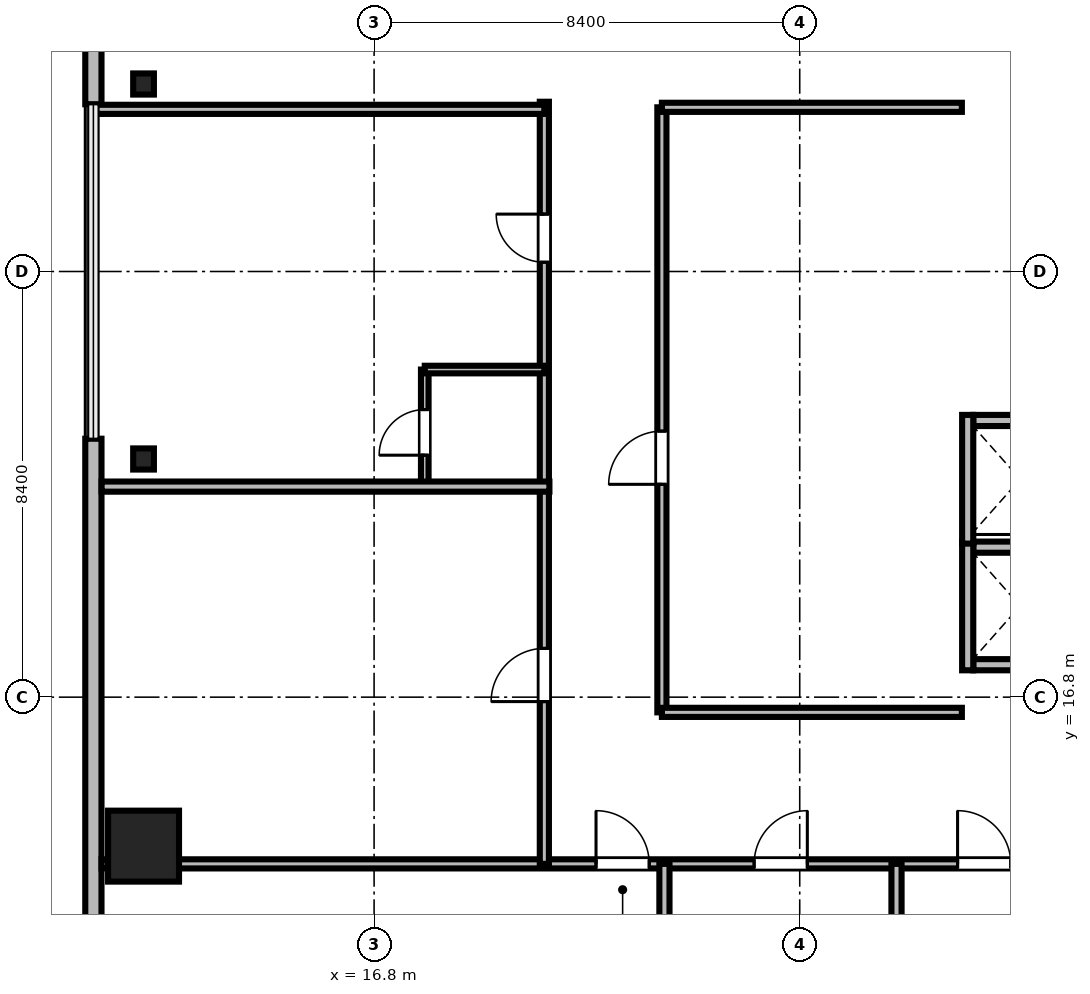
"""IFC4 building model, lengths in metres.
Left out: names, types, materials, properties, quantities, classifications, styles, units other than length and angle.
Written with IfcOpenShell. Run it as: python <this file> out.ifc"""

import sys

from ifc_helpers import new_model, si_unit, direction, frame, frame_2d, origin, origin_2d, place, context, subcontext, project, spatial, rectangle, i_section, extrude, source, transform, mapped, element, fill, save


model = new_model("IFC4")
c1 = context("Model", 3, precision=1e-05, world=origin(), true_north=direction((0.0, 1.0)))
c2 = subcontext(c1, "Body", "Model", "MODEL_VIEW")
j1 = project(units=[si_unit("LENGTHUNIT", "METRE"), si_unit("PLANEANGLEUNIT", "RADIAN")], contexts=[c1])
p1 = place(None, origin())
s1 = spatial("IfcSite", under=j1, at=p1, CompositionType="ELEMENT")
p2 = place(p1, origin())
s2 = spatial("IfcBuilding", under=s1, at=p2, CompositionType="ELEMENT")
p3 = place(p2, frame((0.0, 0.0, 177.2)))
s3 = spatial("IfcBuildingStorey", under=s2, at=p3, CompositionType="ELEMENT", Elevation=177.2)
m1 = source(origin(), c2, "Body", "SweptSolid", [
    extrude(rectangle(XDim=1.4, YDim=1.4, at=origin_2d()), origin(), (0.0, 0.0, 1.0), 3.58),
])
p4 = place(p3, frame((12.25, 13.86, 0.0), z_axis=(0.0, 0.0, 1.0), x_axis=(1.0, 0.0, 0.0)))
e1 = element("IfcColumn", 1, at=p4, inside=s3, PredefinedType="COLUMN", context=c2, shape_type="MappedRepresentation", body=[
    mapped(m1, transform((0.0, 0.0, 0.0), scale=1.0)),
])
m2 = source(origin(), c2, "Body", "SweptSolid", [
    extrude(i_section(OverallWidth=0.409, OverallDepth=0.417, WebThickness=0.021, FlangeThickness=0.033, FilletRadius=0.015, at=origin_2d()), origin(), (0.0, 0.0, 1.0), 3.58),
])
for number, where, z_axis, x_axis in (
    (2, (12.25, 28.9, 0.0), (0.0, 0.0, 1.0), (1.0, 0.0, 0.0)),
    (3, (12.25, 21.5, 0.0), (0.0, 0.0, 1.0), (1.0, 0.0, 0.0)),
):
    element("IfcColumn", number, at=place(p3, frame(where, z_axis=z_axis, x_axis=x_axis)), inside=s3, PredefinedType="COLUMN", context=c2, shape_type="MappedRepresentation", body=[
        mapped(m2, transform((0.0, 0.0, 0.0), scale=1.0)),
    ])
m3 = source(origin(), c2, "Body", "SweptSolid", [
    extrude(rectangle(XDim=15.6, YDim=0.32, at=frame_2d((7.8, 0.0))), origin(), (0.0, 0.0, 1.0), 3.58),
])
p5 = place(p3, frame((11.26, 44.1, 0.0), z_axis=(0.0, 0.0, 1.0), x_axis=(0.0, -1.0, 0.0)))
e4 = element("IfcWall", 4, at=p5, inside=s3, PredefinedType="SOLIDWALL", context=c2, shape_type="MappedRepresentation", body=[
    mapped(m3, transform((0.0, 0.0, 0.0), scale=1.0)),
])
m4 = source(origin(), c2, "Body", "SweptSolid", [
    extrude(rectangle(XDim=1.4, YDim=2.3, at=frame_2d((0.7, 1.15))), frame((0.0, 0.17, 0.0), z_axis=(0.0, -1.0, 0.0), x_axis=(1.0, 0.0, 0.0)), (0.0, 0.0, 1.0), 0.34),
])
p6 = place(p5, frame((9.61, 0.0, 0.0)))
e5 = element("IfcOpeningElement", 5, at=p6, cuts=e4, PredefinedType="OPENING", context=c2, shape_type="MappedRepresentation", body=[
    mapped(m4, transform((0.0, 0.0, 0.0), scale=1.0)),
])
m5 = source(origin(), c2, "Body", "SweptSolid", [
    extrude(rectangle(XDim=2.2, YDim=2.4, at=frame_2d((1.1, 1.2))), frame((0.0, 0.17, 0.0), z_axis=(0.0, -1.0, 0.0), x_axis=(1.0, 0.0, 0.0)), (0.0, 0.0, 1.0), 0.34),
])
p7 = place(p5, frame((3.005, 0.0, 0.72)))
e6 = element("IfcOpeningElement", 6, at=p7, cuts=e4, PredefinedType="OPENING", context=c2, shape_type="MappedRepresentation", body=[
    mapped(m5, transform((0.0, 0.0, 0.0), scale=1.0)),
])
m6 = source(origin(), c2, "Body", "SweptSolid", [
    extrude(rectangle(XDim=15.6, YDim=0.32, at=frame_2d((7.8, 0.0))), origin(), (0.0, 0.0, 1.0), 3.58),
])
p8 = place(p3, frame((11.26, 21.9, 0.0), z_axis=(0.0, 0.0, 1.0), x_axis=(0.0, -1.0, 0.0)))
e7 = element("IfcWall", 7, at=p8, inside=s3, PredefinedType="SOLIDWALL", context=c2, shape_type="MappedRepresentation", body=[
    mapped(m6, transform((0.0, 0.0, 0.0), scale=1.0)),
])
p9 = place(p8, frame((10.395, 0.0, 0.72)))
e8 = element("IfcOpeningElement", 8, at=p9, cuts=e7, PredefinedType="OPENING", context=c2, shape_type="MappedRepresentation", body=[
    mapped(m5, transform((0.0, 0.0, 0.0), scale=1.0)),
])
m7 = source(origin(), c2, "Body", "SweptSolid", [
    extrude(rectangle(XDim=1.85, YDim=0.22, at=frame_2d((0.925, 0.0))), origin(), (0.0, 0.0, 1.0), 3.022),
])
p10 = place(p3, frame((28.625, 17.44, 0.0), z_axis=(0.0, 0.0, 1.0), x_axis=(1.0, 0.0, 0.0)))
e9 = element("IfcWall", 9, at=p10, inside=s3, PredefinedType="SOLIDWALL", context=c2, shape_type="MappedRepresentation", body=[
    mapped(m7, transform((0.0, 0.0, 0.0), scale=1.0)),
])
m8 = source(origin(), c2, "Body", "SweptSolid", [
    extrude(rectangle(XDim=1.85, YDim=0.22, at=frame_2d((0.925, 0.0))), origin(), (0.0, 0.0, 1.0), 3.58),
])
p11 = place(p3, frame((28.625, 19.76, 0.0), z_axis=(0.0, 0.0, 1.0), x_axis=(1.0, 0.0, 0.0)))
e10 = element("IfcWall", 10, at=p11, inside=s3, PredefinedType="SOLIDWALL", context=c2, shape_type="MappedRepresentation", body=[
    mapped(m8, transform((0.0, 0.0, 0.0), scale=1.0)),
])
m9 = source(origin(), c2, "Body", "SweptSolid", [
    extrude(rectangle(XDim=2.54, YDim=0.22, at=frame_2d((1.27, 0.0))), origin(), (0.0, 0.0, 1.0), 3.022),
])
p12 = place(p3, frame((28.515, 17.33, 0.0), z_axis=(0.0, 0.0, 1.0), x_axis=(0.0, 1.0, 0.0)))
e11 = element("IfcWall", 11, at=p12, inside=s3, PredefinedType="SOLIDWALL", context=c2, shape_type="MappedRepresentation", body=[
    mapped(m9, transform((0.0, 0.0, 0.0), scale=1.0)),
])
p13 = place(p3, frame((28.625, 22.26, 0.0), z_axis=(0.0, 0.0, 1.0), x_axis=(1.0, 0.0, 0.0)))
e12 = element("IfcWall", 12, at=p13, inside=s3, PredefinedType="SOLIDWALL", context=c2, shape_type="MappedRepresentation", body=[
    mapped(m8, transform((0.0, 0.0, 0.0), scale=1.0)),
])
m10 = source(origin(), c2, "Body", "SweptSolid", [
    extrude(rectangle(XDim=2.54, YDim=0.22, at=frame_2d((1.27, 0.0))), origin(), (0.0, 0.0, 1.0), 3.58),
])
p14 = place(p3, frame((28.515, 19.83, 0.0), z_axis=(0.0, 0.0, 1.0), x_axis=(0.0, 1.0, 0.0)))
e13 = element("IfcWall", 13, at=p14, inside=s3, PredefinedType="SOLIDWALL", context=c2, shape_type="MappedRepresentation", body=[
    mapped(m10, transform((0.0, 0.0, 0.0), scale=1.0)),
])
m11 = source(origin(), c2, "Body", "SweptSolid", [
    extrude(rectangle(XDim=46.156, YDim=0.18, at=frame_2d((23.078, 0.0))), origin(), (0.0, 0.0, 1.0), 2.822),
])
p15 = place(p3, frame((11.422, 13.51, 0.0), z_axis=(0.0, 0.0, 1.0), x_axis=(1.0, 0.0, 0.0)))
e14 = element("IfcWall", 14, at=p15, inside=s3, PredefinedType="PARTITIONING", context=c2, shape_type="MappedRepresentation", body=[
    mapped(m11, transform((0.0, 0.0, 0.0), scale=1.0)),
])
m12 = source(origin(), c2, "Body", "SweptSolid", [
    extrude(rectangle(XDim=1.05, YDim=2.2, at=frame_2d((0.525, 1.1))), frame((0.0, 0.1, 0.0), z_axis=(0.0, -1.0, 0.0), x_axis=(1.0, 0.0, 0.0)), (0.0, 0.0, 1.0), 0.2),
])
p16 = place(p15, frame((9.758, 0.0, 0.0)))
e15 = element("IfcOpeningElement", 15, at=p16, cuts=e14, PredefinedType="OPENING", context=c2, shape_type="MappedRepresentation", body=[
    mapped(m12, transform((0.0, 0.0, 0.0), scale=1.0)),
])
p17 = place(p15, frame((12.878, 0.0, 0.0)))
e16 = element("IfcOpeningElement", 16, at=p17, cuts=e14, PredefinedType="OPENING", context=c2, shape_type="MappedRepresentation", body=[
    mapped(m12, transform((0.0, 0.0, 0.0), scale=1.0)),
])
p18 = place(p15, frame((16.893, 0.0, 0.0)))
e17 = element("IfcOpeningElement", 17, at=p18, cuts=e14, PredefinedType="OPENING", context=c2, shape_type="MappedRepresentation", body=[
    mapped(m12, transform((0.0, 0.0, 0.0), scale=1.0)),
])
p19 = place(p15, frame((20.344, 0.0, 0.0)))
e18 = element("IfcOpeningElement", 18, at=p19, cuts=e14, PredefinedType="OPENING", context=c2, shape_type="MappedRepresentation", body=[
    mapped(m12, transform((0.0, 0.0, 0.0), scale=1.0)),
])
p20 = place(p15, frame((24.008, 0.0, 0.0)))
e19 = element("IfcOpeningElement", 19, at=p20, cuts=e14, PredefinedType="OPENING", context=c2, shape_type="MappedRepresentation", body=[
    mapped(m12, transform((0.0, 0.0, 0.0), scale=1.0)),
])
p21 = place(p15, frame((28.055, 0.0, 0.0)))
e20 = element("IfcOpeningElement", 20, at=p21, cuts=e14, PredefinedType="OPENING", context=c2, shape_type="MappedRepresentation", body=[
    mapped(m12, transform((0.0, 0.0, 0.0), scale=1.0)),
])
m13 = source(origin(), c2, "Body", "SweptSolid", [
    extrude(rectangle(XDim=0.95, YDim=2.15, at=frame_2d((0.475, 1.075))), frame((0.0, 0.1, 0.0), z_axis=(0.0, -1.0, 0.0), x_axis=(1.0, 0.0, 0.0)), (0.0, 0.0, 1.0), 0.2),
])
p22 = place(p15, frame((34.246, 0.0, 0.0)))
e21 = element("IfcOpeningElement", 21, at=p22, cuts=e14, PredefinedType="OPENING", context=c2, shape_type="MappedRepresentation", body=[
    mapped(m13, transform((0.0, 0.0, 0.0), scale=1.0)),
])
p23 = place(p15, frame((37.498, 0.0, 0.0)))
e22 = element("IfcOpeningElement", 22, at=p23, cuts=e14, PredefinedType="OPENING", context=c2, shape_type="MappedRepresentation", body=[
    mapped(m12, transform((0.0, 0.0, 0.0), scale=1.0)),
])
m14 = source(origin(), c2, "Body", "SweptSolid", [
    extrude(rectangle(XDim=15.04, YDim=0.18, at=frame_2d((7.52, 0.0))), origin(), (0.0, 0.0, 1.0), 3.022),
])
p24 = place(p3, frame((20.16, 13.51, 0.0), z_axis=(0.0, 0.0, 1.0), x_axis=(0.0, 1.0, 0.0)))
e23 = element("IfcWall", 23, at=p24, inside=s3, PredefinedType="PARTITIONING", context=c2, shape_type="MappedRepresentation", body=[
    mapped(m14, transform((0.0, 0.0, 0.0), scale=1.0)),
])
p25 = place(p24, frame((3.202, 0.0, 0.0)))
e24 = element("IfcOpeningElement", 24, at=p25, cuts=e23, PredefinedType="OPENING", context=c2, shape_type="MappedRepresentation", body=[
    mapped(m12, transform((0.0, 0.0, 0.0), scale=1.0)),
])
p26 = place(p24, frame((11.873, 0.0, 0.0)))
e25 = element("IfcOpeningElement", 25, at=p26, cuts=e23, PredefinedType="OPENING", context=c2, shape_type="MappedRepresentation", body=[
    mapped(m13, transform((0.0, 0.0, 0.0), scale=1.0)),
])
m15 = source(origin(), c2, "Body", "SweptSolid", [
    extrude(rectangle(XDim=11.94, YDim=0.18, at=frame_2d((5.97, 0.0))), origin(), (0.0, 0.0, 1.0), 3.022),
])
p27 = place(p3, frame((22.48, 16.5, 0.0), z_axis=(0.0, 0.0, 1.0), x_axis=(0.0, 1.0, 0.0)))
e26 = element("IfcWall", 26, at=p27, inside=s3, PredefinedType="PARTITIONING", context=c2, shape_type="MappedRepresentation", body=[
    mapped(m15, transform((0.0, 0.0, 0.0), scale=1.0)),
])
p28 = place(p27, frame((4.5, 0.0, 0.0)))
e27 = element("IfcOpeningElement", 27, at=p28, cuts=e26, PredefinedType="OPENING", context=c2, shape_type="MappedRepresentation", body=[
    mapped(m12, transform((0.0, 0.0, 0.0), scale=1.0)),
])
m16 = source(origin(), c2, "Body", "SweptSolid", [
    extrude(rectangle(XDim=2.29, YDim=0.15, at=frame_2d((1.145, 0.0))), origin(), (0.0, 0.0, 1.0), 3.58),
])
p29 = place(p3, frame((17.8, 20.975, 0.0), z_axis=(0.0, 0.0, 1.0), x_axis=(0.0, 1.0, 0.0)))
e28 = element("IfcWall", 28, at=p29, inside=s3, PredefinedType="PARTITIONING", context=c2, shape_type="MappedRepresentation", body=[
    mapped(m16, transform((0.0, 0.0, 0.0), scale=1.0)),
])
m17 = source(origin(), c2, "Body", "SweptSolid", [
    extrude(rectangle(XDim=0.9, YDim=2.1, at=frame_2d((0.45, 1.05))), frame((0.0, 0.085, 0.0), z_axis=(0.0, -1.0, 0.0), x_axis=(1.0, 0.0, 0.0)), (0.0, 0.0, 1.0), 0.17),
])
p30 = place(p29, frame((0.6, 0.0, 0.0)))
e29 = element("IfcOpeningElement", 29, at=p30, cuts=e28, PredefinedType="OPENING", context=c2, shape_type="MappedRepresentation", body=[
    mapped(m17, transform((0.0, 0.0, 0.0), scale=1.0)),
])
m18 = source(origin(), c2, "Body", "SweptSolid", [
    extrude(rectangle(XDim=11.388, YDim=0.2, at=frame_2d((5.694, 0.0))), origin(), (0.0, 0.0, 1.0), 2.822),
])
for number, where, z_axis, x_axis in (
    (30, (22.53, 2.122, 0.0), (0.0, 0.0, 1.0), (0.0, 1.0, 0.0)),
    (31, (27.11, 2.122, 0.0), (0.0, 0.0, 1.0), (0.0, 1.0, 0.0)),
):
    element("IfcWall", number, at=place(p3, frame(where, z_axis=z_axis, x_axis=x_axis)), inside=s3, PredefinedType="PARTITIONING", context=c2, shape_type="MappedRepresentation", body=[
        mapped(m18, transform((0.0, 0.0, 0.0), scale=1.0)),
    ])
m19 = source(origin(), c2, "Body", "SweptSolid", [
    extrude(rectangle(XDim=8.838, YDim=0.2, at=frame_2d((4.419, 0.0))), origin(), (0.0, 0.0, 1.0), 2.822),
])
p31 = place(p3, frame((11.422, 20.955, 0.0), z_axis=(0.0, 0.0, 1.0), x_axis=(1.0, 0.0, 0.0)))
e32 = element("IfcWall", 32, at=p31, inside=s3, PredefinedType="PARTITIONING", context=c2, shape_type="MappedRepresentation", body=[
    mapped(m19, transform((0.0, 0.0, 0.0), scale=1.0)),
])
m20 = source(origin(), c2, "Body", "SweptSolid", [
    extrude(rectangle(XDim=8.93, YDim=0.18, at=frame_2d((4.465, 0.0))), origin(), (0.0, 0.0, 1.0), 2.822),
])
p32 = place(p3, frame((11.23, 28.4, 0.0), z_axis=(0.0, 0.0, 1.0), x_axis=(1.0, 0.0, 0.0)))
e33 = element("IfcWall", 33, at=p32, inside=s3, PredefinedType="PARTITIONING", context=c2, shape_type="MappedRepresentation", body=[
    mapped(m20, transform((0.0, 0.0, 0.0), scale=1.0)),
])
m21 = source(origin(), c2, "Body", "SweptSolid", [
    extrude(rectangle(XDim=5.92, YDim=0.18, at=frame_2d((2.96, 0.0))), origin(), (0.0, 0.0, 1.0), 3.58),
])
for number, where, z_axis, x_axis in (
    (34, (22.48, 16.5, 0.0), (0.0, 0.0, 1.0), (1.0, 0.0, 0.0)),
    (35, (22.48, 28.44, 0.0), (0.0, 0.0, 1.0), (1.0, 0.0, 0.0)),
):
    element("IfcWall", number, at=place(p3, frame(where, z_axis=z_axis, x_axis=x_axis)), inside=s3, PredefinedType="PARTITIONING", context=c2, shape_type="MappedRepresentation", body=[
        mapped(m21, transform((0.0, 0.0, 0.0), scale=1.0)),
    ])
m22 = source(origin(), c2, "Body", "SweptSolid", [
    extrude(rectangle(XDim=2.36, YDim=0.15, at=frame_2d((1.18, 0.0))), origin(), (0.0, 0.0, 1.0), 3.58),
])
p33 = place(p3, frame((17.8, 23.265, 0.0), z_axis=(0.0, 0.0, 1.0), x_axis=(1.0, 0.0, 0.0)))
e36 = element("IfcWall", 36, at=p33, inside=s3, PredefinedType="PARTITIONING", context=c2, shape_type="MappedRepresentation", body=[
    mapped(m22, transform((0.0, 0.0, 0.0), scale=1.0)),
])
m23 = source(origin(), c2, "Body", "SweptSolid", [
    extrude(rectangle(XDim=1.05, YDim=2.2, at=frame_2d((0.525, 1.1))), frame((0.0, 0.025, 0.0), z_axis=(0.0, -1.0, 0.0), x_axis=(1.0, 0.0, 0.0)), (0.0, 0.0, 1.0), 0.05),
])
p34 = place(p16, origin())
e37 = element("IfcDoor", 37, at=p34, inside=s3, OperationType="SINGLE_SWING_LEFT", PredefinedType="DOOR", context=c2, shape_type="MappedRepresentation", body=[
    mapped(m23, transform((0.0, 0.0, 0.0), scale=1.0)),
])
fill(e15, e37)
p35 = place(p17, origin())
e38 = element("IfcDoor", 38, at=p35, inside=s3, OperationType="SINGLE_SWING_RIGHT", PredefinedType="DOOR", context=c2, shape_type="MappedRepresentation", body=[
    mapped(m23, transform((0.0, 0.0, 0.0), scale=1.0)),
])
fill(e16, e38)
p36 = place(p18, origin())
e39 = element("IfcDoor", 39, at=p36, inside=s3, OperationType="SINGLE_SWING_LEFT", PredefinedType="DOOR", context=c2, shape_type="MappedRepresentation", body=[
    mapped(m23, transform((0.0, 0.0, 0.0), scale=1.0)),
])
fill(e17, e39)
p37 = place(p25, origin())
e40 = element("IfcDoor", 40, at=p37, inside=s3, OperationType="SINGLE_SWING_LEFT", PredefinedType="DOOR", context=c2, shape_type="MappedRepresentation", body=[
    mapped(m23, transform((0.0, 0.0, 0.0), scale=1.0)),
])
fill(e24, e40)
m24 = source(origin(), c2, "Body", "SweptSolid", [
    extrude(rectangle(XDim=0.95, YDim=2.15, at=frame_2d((0.475, 1.075))), frame((0.0, 0.025, 0.0), z_axis=(0.0, -1.0, 0.0), x_axis=(1.0, 0.0, 0.0)), (0.0, 0.0, 1.0), 0.05),
])
p38 = place(p26, origin())
e41 = element("IfcDoor", 41, at=p38, inside=s3, OperationType="SINGLE_SWING_RIGHT", PredefinedType="DOOR", context=c2, shape_type="MappedRepresentation", body=[
    mapped(m24, transform((0.0, 0.0, 0.0), scale=1.0)),
])
fill(e25, e41)
p39 = place(p28, origin())
e42 = element("IfcDoor", 42, at=p39, inside=s3, OperationType="SINGLE_SWING_LEFT", PredefinedType="DOOR", context=c2, shape_type="MappedRepresentation", body=[
    mapped(m23, transform((0.0, 0.0, 0.0), scale=1.0)),
])
fill(e27, e42)
m25 = source(origin(), c2, "Body", "SweptSolid", [
    extrude(rectangle(XDim=0.9, YDim=2.1, at=frame_2d((0.45, 1.05))), frame((0.0, 0.025, 0.0), z_axis=(0.0, -1.0, 0.0), x_axis=(1.0, 0.0, 0.0)), (0.0, 0.0, 1.0), 0.05),
])
p40 = place(p30, origin())
e43 = element("IfcDoor", 43, at=p40, inside=s3, OperationType="SINGLE_SWING_LEFT", PredefinedType="DOOR", context=c2, shape_type="MappedRepresentation", body=[
    mapped(m25, transform((0.0, 0.0, 0.0), scale=1.0)),
])
fill(e29, e43)
save(model, sys.argv[1])
